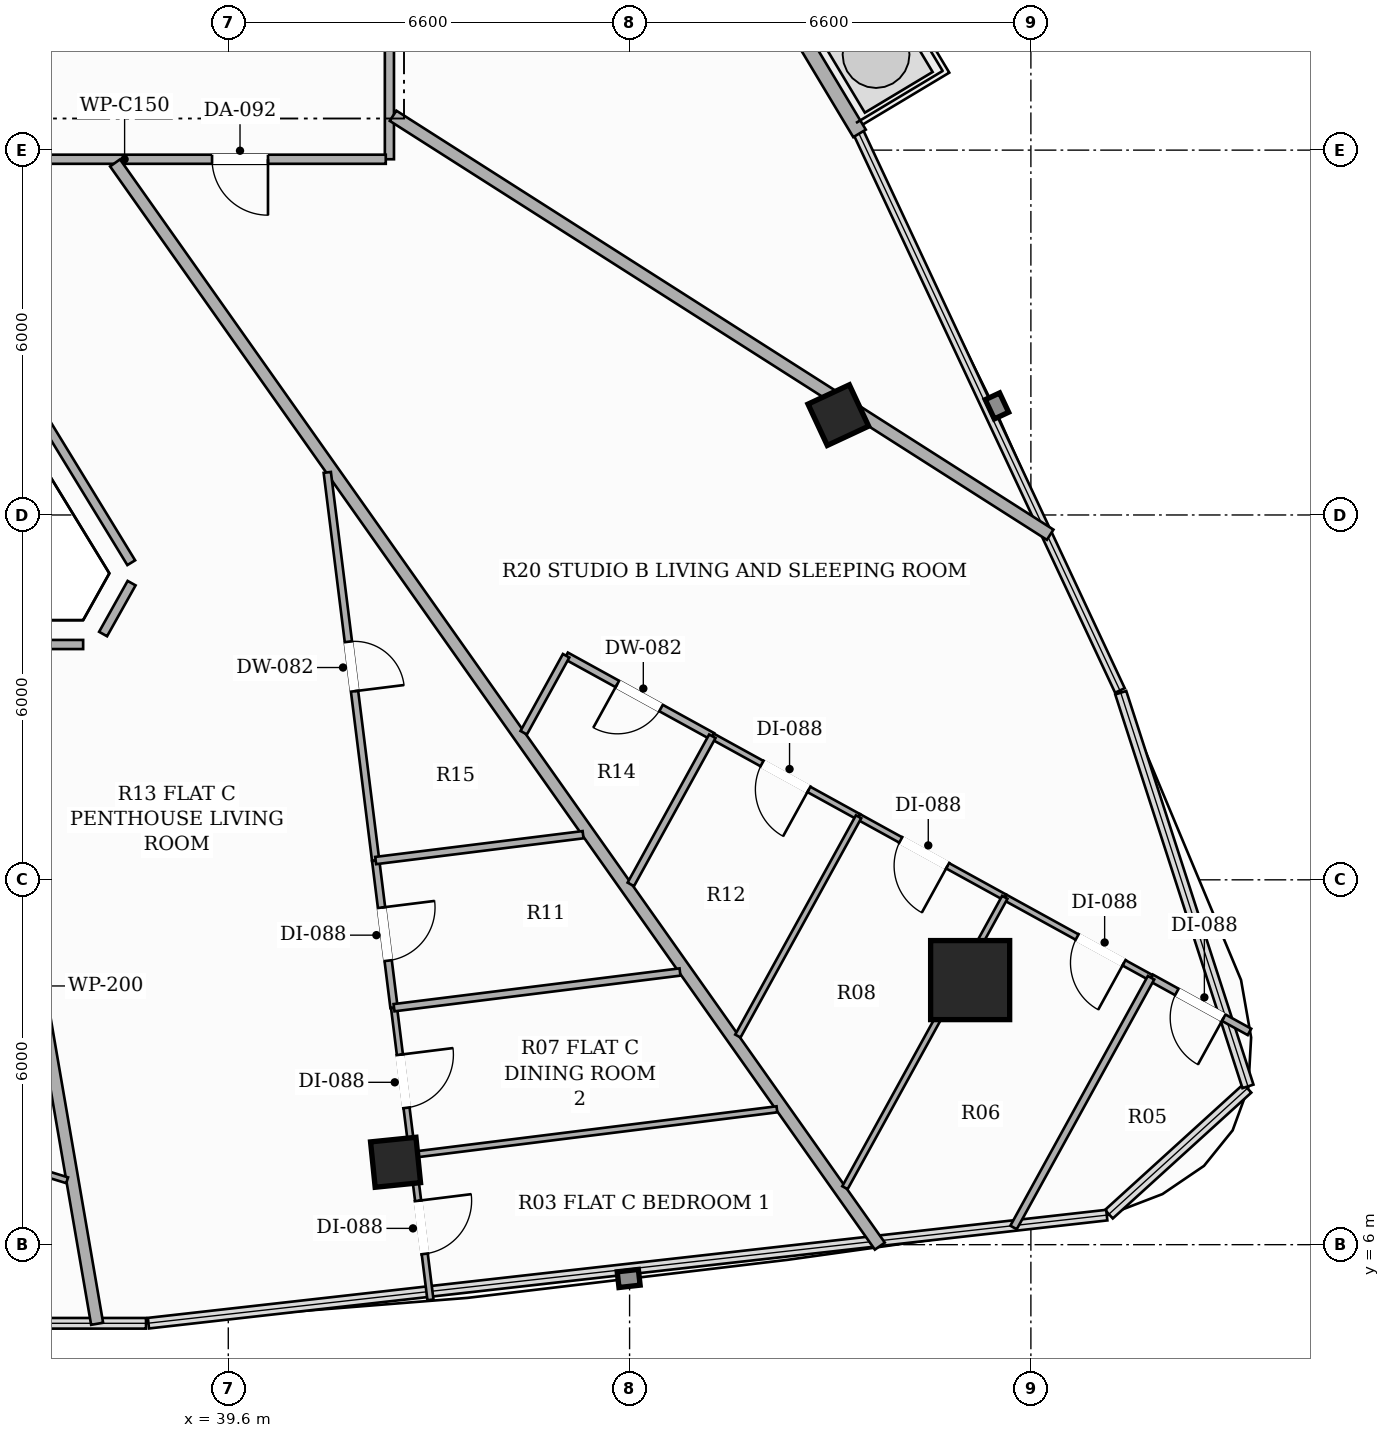
"""IFC4 building model, lengths in metres.
Left out: names, types, materials, properties, quantities, classifications, styles, units other than length and angle.
Written with IfcOpenShell. Run it as: python <this file> out.ifc"""

import sys

from ifc_helpers import new_model, si_unit, direction, frame, frame_2d, origin, origin_2d, place, context, subcontext, project, spatial, rectangle, hollow_rectangle, extrude, element, fill, save


model = new_model("IFC4")
c1 = context("Model", 3, precision=1e-05, world=origin(), true_north=direction((0.0, 1.0)))
c2 = subcontext(c1, "Body", "Model", "MODEL_VIEW")
j1 = project(units=[si_unit("LENGTHUNIT", "METRE"), si_unit("PLANEANGLEUNIT", "RADIAN")], contexts=[c1])
p1 = place(None, origin())
s1 = spatial("IfcSite", under=j1, at=p1, CompositionType="ELEMENT")
p2 = place(p1, origin())
s2 = spatial("IfcBuilding", under=s1, at=p2, CompositionType="ELEMENT")
p3 = place(p2, frame((0.0, 0.0, 212.9)))
s3 = spatial("IfcBuildingStorey", under=s2, at=p3, CompositionType="ELEMENT", Elevation=212.9)
p4 = place(p3, frame((51.801, 10.351, 0.0), z_axis=(0.0, 0.0, 1.0), x_axis=(1.0, 0.0, 0.0)))
e1 = element("IfcColumn", 1, at=p4, inside=s3, PredefinedType="COLUMN", context=c2, shape_type="SweptSolid", body=[
    extrude(hollow_rectangle(XDim=1.3, YDim=1.3, WallThickness=0.04, at=origin_2d()), origin(), (0.0, 0.0, 1.0), 3.3),
])
for number, where, z_axis, x_axis in (
    (2, (42.351, 7.355, 0.0), (0.0, 0.0, 1.0), (0.995, 0.101, 0.0)),
    (3, (49.633, 19.642, 0.0), (0.0, 0.0, 1.0), (-0.423, 0.906, 0.0)),
):
    element("IfcColumn", number, at=place(p3, frame(where, z_axis=z_axis, x_axis=x_axis)), inside=s3, PredefinedType="COLUMN", context=c2, shape_type="SweptSolid", body=[
        extrude(hollow_rectangle(XDim=0.75, YDim=0.75, WallThickness=0.025, at=origin_2d()), origin(), (0.0, 0.0, 1.0), 3.3),
    ])
p5 = place(p3, frame((49.982, 24.275, 0.0), z_axis=(0.0, 0.0, 1.0), x_axis=(-0.514391899557, 0.857555230682, 0.0)))
e4 = element("IfcWall", 4, at=p5, inside=s3, PredefinedType="SOLIDWALL", context=c2, shape_type="SweptSolid", body=[
    extrude(rectangle(XDim=10.371, YDim=0.24, at=frame_2d((5.186, 0.0))), origin(), (0.0, 0.0, 1.0), 2.624),
])
p6 = place(p5, frame((7.874, 0.0, 0.0)))
e5 = element("IfcOpeningElement", 5, at=p6, cuts=e4, PredefinedType="OPENING", context=c2, shape_type="SweptSolid", body=[
    extrude(rectangle(XDim=1.8, YDim=2.2, at=frame_2d((0.9, 1.1))), frame((0.0, 0.13, 0.0), z_axis=(0.0, -1.0, 0.0), x_axis=(1.0, 0.0, 0.0)), (0.0, 0.0, 1.0), 0.26),
])
p7 = place(p3, frame((42.25, 26.59, 0.0), z_axis=(0.0, 0.0, 1.0), x_axis=(0.0, -1.0, 0.0)))
e6 = element("IfcWall", 6, at=p7, inside=s3, PredefinedType="PARTITIONING", context=c2, shape_type="SweptSolid", body=[
    extrude(rectangle(XDim=2.74, YDim=0.15, at=frame_2d((1.37, 0.0))), origin(), (0.0, 0.0, 1.0), 2.773),
])
p8 = place(p3, frame((42.19, 23.85, 0.0), z_axis=(0.0, 0.0, 1.0), x_axis=(-1.0, 0.0, 0.0)))
e7 = element("IfcWall", 7, at=p8, inside=s3, PredefinedType="PARTITIONING", context=c2, shape_type="SweptSolid", body=[
    extrude(rectangle(XDim=8.24, YDim=0.15, at=frame_2d((4.12, 0.0))), origin(), (0.0, 0.0, 1.0), 2.565),
])
p9 = place(p8, frame((1.937, 0.0, 0.0)))
e8 = element("IfcOpeningElement", 8, at=p9, cuts=e7, PredefinedType="OPENING", context=c2, shape_type="SweptSolid", body=[
    extrude(rectangle(XDim=0.92, YDim=2.15, at=frame_2d((0.46, 1.075))), frame((0.0, 0.085, 0.0), z_axis=(0.0, -1.0, 0.0), x_axis=(1.0, 0.0, 0.0)), (0.0, 0.0, 1.0), 0.17),
])
p10 = place(p8, frame((5.733, 0.0, 0.0)))
e9 = element("IfcOpeningElement", 9, at=p10, cuts=e7, PredefinedType="OPENING", context=c2, shape_type="SweptSolid", body=[
    extrude(rectangle(XDim=0.92, YDim=2.15, at=frame_2d((0.46, 1.075))), frame((0.0, 0.085, 0.0), z_axis=(0.0, -1.0, 0.0), x_axis=(1.0, 0.0, 0.0)), (0.0, 0.0, 1.0), 0.17),
])
p11 = place(p3, frame((33.987, 23.79, 0.0), z_axis=(0.0, 0.0, 1.0), x_axis=(0.521338496894, -0.853349970209, 0.0)))
e10 = element("IfcWall", 10, at=p11, inside=s3, PredefinedType="PARTITIONING", context=c2, shape_type="SweptSolid", body=[
    extrude(rectangle(XDim=7.705, YDim=0.15, at=frame_2d((3.853, 0.0))), origin(), (0.0, 0.0, 1.0), 2.773),
])
p12 = place(p3, frame((38.01, 16.879, 0.0), z_axis=(0.0, 0.0, 1.0), x_axis=(-0.488859069364, -0.872362774481, 0.0)))
e11 = element("IfcWall", 11, at=p12, inside=s3, PredefinedType="PARTITIONING", context=c2, shape_type="SweptSolid", body=[
    extrude(rectangle(XDim=0.959, YDim=0.15, at=frame_2d((0.48, 0.0))), origin(), (0.0, 0.0, 1.0), 3.06),
])
p13 = place(p3, frame((37.213, 15.87, 0.0), z_axis=(0.0, 0.0, 1.0), x_axis=(-1.0, 0.0, 0.0)))
e12 = element("IfcWall", 12, at=p13, inside=s3, PredefinedType="PARTITIONING", context=c2, shape_type="SweptSolid", body=[
    extrude(rectangle(XDim=8.426, YDim=0.15, at=frame_2d((4.213, 0.0))), origin(), (0.0, 0.0, 1.0), 2.773),
])
p14 = place(p3, frame((35.53, 15.81, 0.0), z_axis=(0.0, 0.0, 1.0), x_axis=(0.169681394536, -0.985498972272, 0.0)))
e13 = element("IfcWall", 13, at=p14, inside=s3, PredefinedType="PARTITIONING", context=c2, shape_type="SweptSolid", body=[
    extrude(rectangle(XDim=11.275, YDim=0.2, at=frame_2d((5.637, 0.0))), origin(), (0.0, 0.0, 1.0), 2.492),
])
p15 = place(p3, frame((50.316, 5.976, 0.0), z_axis=(0.0, 0.0, 1.0), x_axis=(-0.576784728977, 0.816896184603, 0.0)))
e14 = element("IfcWall", 14, at=p15, inside=s3, PredefinedType="PARTITIONING", context=c2, shape_type="SweptSolid", body=[
    extrude(rectangle(XDim=21.807, YDim=0.2, at=frame_2d((10.903, 0.0))), origin(), (0.0, 0.0, 1.0), 2.492),
])
p16 = place(p3, frame((42.31, 24.565, 0.0), z_axis=(0.0, 0.0, 1.0), x_axis=(0.843209388644, -0.537585274075, 0.0)))
e15 = element("IfcWall", 15, at=p16, inside=s3, PredefinedType="PARTITIONING", context=c2, shape_type="SweptSolid", body=[
    extrude(rectangle(XDim=12.816, YDim=0.2, at=frame_2d((6.408, 0.0))), origin(), (0.0, 0.0, 1.0), 2.492),
])
p17 = place(p3, frame((29.459, 9.37, 0.0), z_axis=(0.0, 0.0, 1.0), x_axis=(0.955559226726, -0.294799193044, 0.0)))
e16 = element("IfcWall", 16, at=p17, inside=s3, PredefinedType="PARTITIONING", context=c2, shape_type="SweptSolid", body=[
    extrude(rectangle(XDim=7.839, YDim=0.1, at=frame_2d((3.92, 0.0))), origin(), (0.0, 0.0, 1.0), 2.492),
])
p18 = place(p3, frame((47.561, 14.361, 0.0), z_axis=(0.0, 0.0, 1.0), x_axis=(-0.876029965154, 0.482256674554, 0.0)))
e17 = element("IfcWall", 17, at=p18, inside=s3, PredefinedType="PARTITIONING", context=c2, shape_type="SweptSolid", body=[
    extrude(rectangle(XDim=2.745, YDim=0.12, at=frame_2d((1.373, 0.0))), origin(), (0.0, 0.0, 1.0), 3.06),
])
p19 = place(p18, frame((0.963, 0.0, 0.0)))
e18 = element("IfcOpeningElement", 18, at=p19, cuts=e17, PredefinedType="OPENING", context=c2, shape_type="SweptSolid", body=[
    extrude(rectangle(XDim=0.82, YDim=2.1, at=frame_2d((0.41, 1.05))), frame((0.0, 0.07, 0.0), z_axis=(0.0, -1.0, 0.0), x_axis=(1.0, 0.0, 0.0)), (0.0, 0.0, 1.0), 0.14),
])
p20 = place(p3, frame((45.156, 15.685, 0.0), z_axis=(0.0, 0.0, 1.0), x_axis=(-0.482268873401, -0.876023249548, 0.0)))
e19 = element("IfcWall", 19, at=p20, inside=s3, PredefinedType="PARTITIONING", context=c2, shape_type="SweptSolid", body=[
    extrude(rectangle(XDim=1.445, YDim=0.12, at=frame_2d((0.723, 0.0))), origin(), (0.0, 0.0, 1.0), 2.773),
])
p21 = place(p3, frame((56.395, 9.499, 0.0), z_axis=(0.0, 0.0, 1.0), x_axis=(-0.876137798995, 0.482060740128, 0.0)))
e20 = element("IfcWall", 20, at=p21, inside=s3, PredefinedType="PARTITIONING", context=c2, shape_type="SweptSolid", body=[
    extrude(rectangle(XDim=1.848, YDim=0.12, at=frame_2d((0.924, 0.0))), origin(), (0.0, 0.0, 1.0), 3.06),
])
p22 = place(p21, frame((0.484, 0.0, 0.0)))
e21 = element("IfcOpeningElement", 21, at=p22, cuts=e20, PredefinedType="OPENING", context=c2, shape_type="SweptSolid", body=[
    extrude(rectangle(XDim=0.88, YDim=2.1, at=frame_2d((0.44, 1.05))), frame((0.0, 0.07, 0.0), z_axis=(0.0, -1.0, 0.0), x_axis=(1.0, 0.0, 0.0)), (0.0, 0.0, 1.0), 0.14),
])
p23 = place(p3, frame((54.776, 10.39, 0.0), z_axis=(0.0, 0.0, 1.0), x_axis=(-0.876159561865, 0.48202118434, 0.0)))
e22 = element("IfcWall", 22, at=p23, inside=s3, PredefinedType="PARTITIONING", context=c2, shape_type="SweptSolid", body=[
    extrude(rectangle(XDim=2.745, YDim=0.1, at=frame_2d((1.372, 0.0))), origin(), (0.0, 0.0, 1.0), 3.06),
])
p24 = place(p23, frame((0.508, 0.0, 0.0)))
e23 = element("IfcOpeningElement", 23, at=p24, cuts=e22, PredefinedType="OPENING", context=c2, shape_type="SweptSolid", body=[
    extrude(rectangle(XDim=0.88, YDim=2.1, at=frame_2d((0.44, 1.05))), frame((0.0, 0.06, 0.0), z_axis=(0.0, -1.0, 0.0), x_axis=(1.0, 0.0, 0.0)), (0.0, 0.0, 1.0), 0.12),
])
p25 = place(p3, frame((52.371, 11.713, 0.0), z_axis=(0.0, 0.0, 1.0), x_axis=(-0.87599239457, 0.482324916064, 0.0)))
e24 = element("IfcWall", 24, at=p25, inside=s3, PredefinedType="PARTITIONING", context=c2, shape_type="SweptSolid", body=[
    extrude(rectangle(XDim=2.746, YDim=0.1, at=frame_2d((1.373, 0.0))), origin(), (0.0, 0.0, 1.0), 2.492),
])
p26 = place(p25, frame((1.074, 0.0, 0.0)))
e25 = element("IfcOpeningElement", 25, at=p26, cuts=e24, PredefinedType="OPENING", context=c2, shape_type="SweptSolid", body=[
    extrude(rectangle(XDim=0.88, YDim=2.1, at=frame_2d((0.44, 1.05))), frame((0.0, 0.06, 0.0), z_axis=(0.0, -1.0, 0.0), x_axis=(1.0, 0.0, 0.0)), (0.0, 0.0, 1.0), 0.12),
])
p27 = place(p3, frame((49.966, 13.037, 0.0), z_axis=(0.0, 0.0, 1.0), x_axis=(-0.876029965154, 0.482256674554, 0.0)))
e26 = element("IfcWall", 26, at=p27, inside=s3, PredefinedType="PARTITIONING", context=c2, shape_type="SweptSolid", body=[
    extrude(rectangle(XDim=2.745, YDim=0.1, at=frame_2d((1.373, 0.0))), origin(), (0.0, 0.0, 1.0), 2.565),
])
p28 = place(p27, frame((0.933, 0.0, 0.0)))
e27 = element("IfcOpeningElement", 27, at=p28, cuts=e26, PredefinedType="OPENING", context=c2, shape_type="SweptSolid", body=[
    extrude(rectangle(XDim=0.88, YDim=2.1, at=frame_2d((0.44, 1.05))), frame((0.0, 0.06, 0.0), z_axis=(0.0, -1.0, 0.0), x_axis=(1.0, 0.0, 0.0)), (0.0, 0.0, 1.0), 0.12),
])
p29 = place(p3, frame((47.561, 14.361, 0.0), z_axis=(0.0, 0.0, 1.0), x_axis=(-0.482262481374, -0.87602676846, 0.0)))
e28 = element("IfcWall", 28, at=p29, inside=s3, PredefinedType="PARTITIONING", context=c2, shape_type="SweptSolid", body=[
    extrude(rectangle(XDim=2.781, YDim=0.12, at=frame_2d((1.39, 0.0))), origin(), (0.0, 0.0, 1.0), 3.06),
])
p30 = place(p3, frame((52.515, 6.283, 0.0), z_axis=(0.0, 0.0, 1.0), x_axis=(0.482274545088, 0.876020127143, 0.0)))
e29 = element("IfcWall", 29, at=p30, inside=s3, PredefinedType="PARTITIONING", context=c2, shape_type="SweptSolid", body=[
    extrude(rectangle(XDim=4.688, YDim=0.12, at=frame_2d((2.344, 0.0))), origin(), (0.0, 0.0, 1.0), 3.06),
])
p31 = place(p3, frame((49.742, 6.937, 0.0), z_axis=(0.0, 0.0, 1.0), x_axis=(0.482259092216, 0.876028634221, 0.0)))
e30 = element("IfcWall", 30, at=p31, inside=s3, PredefinedType="PARTITIONING", context=c2, shape_type="SweptSolid", body=[
    extrude(rectangle(XDim=5.452, YDim=0.1, at=frame_2d((2.726, 0.0))), origin(), (0.0, 0.0, 1.0), 2.492),
])
p32 = place(p3, frame((47.981, 9.431, 0.0), z_axis=(0.0, 0.0, 1.0), x_axis=(0.482235180657, 0.876041797255, 0.0)))
e31 = element("IfcWall", 31, at=p32, inside=s3, PredefinedType="PARTITIONING", context=c2, shape_type="SweptSolid", body=[
    extrude(rectangle(XDim=4.116, YDim=0.1, at=frame_2d((2.058, 0.0))), origin(), (0.0, 0.0, 1.0), 2.492),
])
p33 = place(p3, frame((41.228, 18.7, 0.0), z_axis=(0.0, 0.0, 1.0), x_axis=(0.123731094195, -0.992315784581, 0.0)))
e32 = element("IfcWall", 32, at=p33, inside=s3, PredefinedType="PARTITIONING", context=c2, shape_type="SweptSolid", body=[
    extrude(rectangle(XDim=6.432, YDim=0.12, at=frame_2d((3.216, 0.0))), origin(), (0.0, 0.0, 1.0), 3.06),
])
p34 = place(p33, frame((2.806, 0.0, 0.0)))
e33 = element("IfcOpeningElement", 33, at=p34, cuts=e32, PredefinedType="OPENING", context=c2, shape_type="SweptSolid", body=[
    extrude(rectangle(XDim=0.82, YDim=2.1, at=frame_2d((0.41, 1.05))), frame((0.0, 0.07, 0.0), z_axis=(0.0, -1.0, 0.0), x_axis=(1.0, 0.0, 0.0)), (0.0, 0.0, 1.0), 0.14),
])
p35 = place(p3, frame((42.024, 12.317, 0.0), z_axis=(0.0, 0.0, 1.0), x_axis=(0.123837590029, -0.992302499894, 0.0)))
e34 = element("IfcWall", 34, at=p35, inside=s3, PredefinedType="PARTITIONING", context=c2, shape_type="SweptSolid", body=[
    extrude(rectangle(XDim=2.439, YDim=0.12, at=frame_2d((1.219, 0.0))), origin(), (0.0, 0.0, 1.0), 3.06),
])
p36 = place(p35, frame((0.779, 0.0, 0.0)))
e35 = element("IfcOpeningElement", 35, at=p36, cuts=e34, PredefinedType="OPENING", context=c2, shape_type="SweptSolid", body=[
    extrude(rectangle(XDim=0.88, YDim=2.1, at=frame_2d((0.44, 1.05))), frame((0.0, 0.07, 0.0), z_axis=(0.0, -1.0, 0.0), x_axis=(1.0, 0.0, 0.0)), (0.0, 0.0, 1.0), 0.14),
])
p37 = place(p3, frame((42.628, 7.478, 0.0), z_axis=(0.0, 0.0, 1.0), x_axis=(0.123572330504, -0.992335567806, 0.0)))
e36 = element("IfcWall", 36, at=p37, inside=s3, PredefinedType="PARTITIONING", context=c2, shape_type="SweptSolid", body=[
    extrude(rectangle(XDim=2.404, YDim=0.1, at=frame_2d((1.202, 0.0))), origin(), (0.0, 0.0, 1.0), 2.492),
])
p38 = place(p37, frame((0.762, 0.0, 0.0)))
e37 = element("IfcOpeningElement", 37, at=p38, cuts=e36, PredefinedType="OPENING", context=c2, shape_type="SweptSolid", body=[
    extrude(rectangle(XDim=0.88, YDim=2.1, at=frame_2d((0.44, 1.05))), frame((0.0, 0.06, 0.0), z_axis=(0.0, -1.0, 0.0), x_axis=(1.0, 0.0, 0.0)), (0.0, 0.0, 1.0), 0.12),
])
p39 = place(p3, frame((42.326, 9.897, 0.0), z_axis=(0.0, 0.0, 1.0), x_axis=(0.123886817851, -0.992296355109, 0.0)))
e38 = element("IfcWall", 38, at=p39, inside=s3, PredefinedType="PARTITIONING", context=c2, shape_type="SweptSolid", body=[
    extrude(rectangle(XDim=2.438, YDim=0.1, at=frame_2d((1.219, 0.0))), origin(), (0.0, 0.0, 1.0), 2.492),
])
p40 = place(p39, frame((0.779, 0.0, 0.0)))
e39 = element("IfcOpeningElement", 39, at=p40, cuts=e38, PredefinedType="OPENING", context=c2, shape_type="SweptSolid", body=[
    extrude(rectangle(XDim=0.88, YDim=2.1, at=frame_2d((0.44, 1.05))), frame((0.0, 0.06, 0.0), z_axis=(0.0, -1.0, 0.0), x_axis=(1.0, 0.0, 0.0)), (0.0, 0.0, 1.0), 0.12),
])
p41 = place(p3, frame((45.435, 12.742, 0.0), z_axis=(0.0, 0.0, 1.0), x_axis=(-0.99232587892, -0.123650111308, 0.0)))
e40 = element("IfcWall", 40, at=p41, inside=s3, PredefinedType="PARTITIONING", context=c2, shape_type="SweptSolid", body=[
    extrude(rectangle(XDim=3.438, YDim=0.12, at=frame_2d((1.719, 0.0))), origin(), (0.0, 0.0, 1.0), 2.773),
])
p42 = place(p3, frame((47.029, 10.484, 0.0), z_axis=(0.0, 0.0, 1.0), x_axis=(-0.992303215116, -0.123831858863, 0.0)))
e41 = element("IfcWall", 41, at=p42, inside=s3, PredefinedType="PARTITIONING", context=c2, shape_type="SweptSolid", body=[
    extrude(rectangle(XDim=4.74, YDim=0.12, at=frame_2d((2.37, 0.0))), origin(), (0.0, 0.0, 1.0), 2.773),
])
p43 = place(p3, frame((42.628, 7.478, 0.0), z_axis=(0.0, 0.0, 1.0), x_axis=(0.992305206969, 0.123815896488, 0.0)))
e42 = element("IfcWall", 42, at=p43, inside=s3, PredefinedType="PARTITIONING", context=c2, shape_type="SweptSolid", body=[
    extrude(rectangle(XDim=6.042, YDim=0.1, at=frame_2d((3.021, 0.0))), origin(), (0.0, 0.0, 1.0), 2.492),
])
p44 = place(p9, origin())
e43 = element("IfcDoor", 43, at=p44, inside=s3, OperationType="SINGLE_SWING_LEFT", PredefinedType="DOOR", context=c2, shape_type="SweptSolid", body=[
    extrude(rectangle(XDim=0.92, YDim=2.15, at=frame_2d((0.46, 1.075))), frame((0.0, 0.025, 0.0), z_axis=(0.0, -1.0, 0.0), x_axis=(1.0, 0.0, 0.0)), (0.0, 0.0, 1.0), 0.05),
])
fill(e8, e43)
p45 = place(p19, origin())
e44 = element("IfcDoor", 44, at=p45, inside=s3, OperationType="SINGLE_SWING_RIGHT", PredefinedType="DOOR", context=c2, shape_type="SweptSolid", body=[
    extrude(rectangle(XDim=0.82, YDim=2.1, at=frame_2d((0.41, 1.05))), frame((0.0, 0.025, 0.0), z_axis=(0.0, -1.0, 0.0), x_axis=(1.0, 0.0, 0.0)), (0.0, 0.0, 1.0), 0.05),
])
fill(e18, e44)
p46 = place(p22, origin())
e45 = element("IfcDoor", 45, at=p46, inside=s3, OperationType="SINGLE_SWING_LEFT", PredefinedType="DOOR", context=c2, shape_type="SweptSolid", body=[
    extrude(rectangle(XDim=0.88, YDim=2.1, at=frame_2d((0.44, 1.05))), frame((0.0, 0.025, 0.0), z_axis=(0.0, -1.0, 0.0), x_axis=(1.0, 0.0, 0.0)), (0.0, 0.0, 1.0), 0.05),
])
fill(e21, e45)
p47 = place(p24, origin())
e46 = element("IfcDoor", 46, at=p47, inside=s3, OperationType="SINGLE_SWING_LEFT", PredefinedType="DOOR", context=c2, shape_type="SweptSolid", body=[
    extrude(rectangle(XDim=0.88, YDim=2.1, at=frame_2d((0.44, 1.05))), frame((0.0, 0.025, 0.0), z_axis=(0.0, -1.0, 0.0), x_axis=(1.0, 0.0, 0.0)), (0.0, 0.0, 1.0), 0.05),
])
fill(e23, e46)
p48 = place(p26, origin())
e47 = element("IfcDoor", 47, at=p48, inside=s3, OperationType="SINGLE_SWING_LEFT", PredefinedType="DOOR", context=c2, shape_type="SweptSolid", body=[
    extrude(rectangle(XDim=0.88, YDim=2.1, at=frame_2d((0.44, 1.05))), frame((0.0, 0.025, 0.0), z_axis=(0.0, -1.0, 0.0), x_axis=(1.0, 0.0, 0.0)), (0.0, 0.0, 1.0), 0.05),
])
fill(e25, e47)
p49 = place(p28, origin())
e48 = element("IfcDoor", 48, at=p49, inside=s3, OperationType="SINGLE_SWING_LEFT", PredefinedType="DOOR", context=c2, shape_type="SweptSolid", body=[
    extrude(rectangle(XDim=0.88, YDim=2.1, at=frame_2d((0.44, 1.05))), frame((0.0, 0.025, 0.0), z_axis=(0.0, -1.0, 0.0), x_axis=(1.0, 0.0, 0.0)), (0.0, 0.0, 1.0), 0.05),
])
fill(e27, e48)
p50 = place(p34, origin())
e49 = element("IfcDoor", 49, at=p50, inside=s3, OperationType="SINGLE_SWING_RIGHT", PredefinedType="DOOR", context=c2, shape_type="SweptSolid", body=[
    extrude(rectangle(XDim=0.82, YDim=2.1, at=frame_2d((0.41, 1.05))), frame((0.0, 0.025, 0.0), z_axis=(0.0, -1.0, 0.0), x_axis=(1.0, 0.0, 0.0)), (0.0, 0.0, 1.0), 0.05),
])
fill(e33, e49)
p51 = place(p36, origin())
e50 = element("IfcDoor", 50, at=p51, inside=s3, OperationType="SINGLE_SWING_LEFT", PredefinedType="DOOR", context=c2, shape_type="SweptSolid", body=[
    extrude(rectangle(XDim=0.88, YDim=2.1, at=frame_2d((0.44, 1.05))), frame((0.0, 0.025, 0.0), z_axis=(0.0, -1.0, 0.0), x_axis=(1.0, 0.0, 0.0)), (0.0, 0.0, 1.0), 0.05),
])
fill(e35, e50)
p52 = place(p38, origin())
e51 = element("IfcDoor", 51, at=p52, inside=s3, OperationType="SINGLE_SWING_LEFT", PredefinedType="DOOR", context=c2, shape_type="SweptSolid", body=[
    extrude(rectangle(XDim=0.88, YDim=2.1, at=frame_2d((0.44, 1.05))), frame((0.0, 0.025, 0.0), z_axis=(0.0, -1.0, 0.0), x_axis=(1.0, 0.0, 0.0)), (0.0, 0.0, 1.0), 0.05),
])
fill(e37, e51)
p53 = place(p40, origin())
e52 = element("IfcDoor", 52, at=p53, inside=s3, OperationType="SINGLE_SWING_LEFT", PredefinedType="DOOR", context=c2, shape_type="SweptSolid", body=[
    extrude(rectangle(XDim=0.88, YDim=2.1, at=frame_2d((0.44, 1.05))), frame((0.0, 0.025, 0.0), z_axis=(0.0, -1.0, 0.0), x_axis=(1.0, 0.0, 0.0)), (0.0, 0.0, 1.0), 0.05),
])
fill(e39, e52)
save(model, sys.argv[1])
